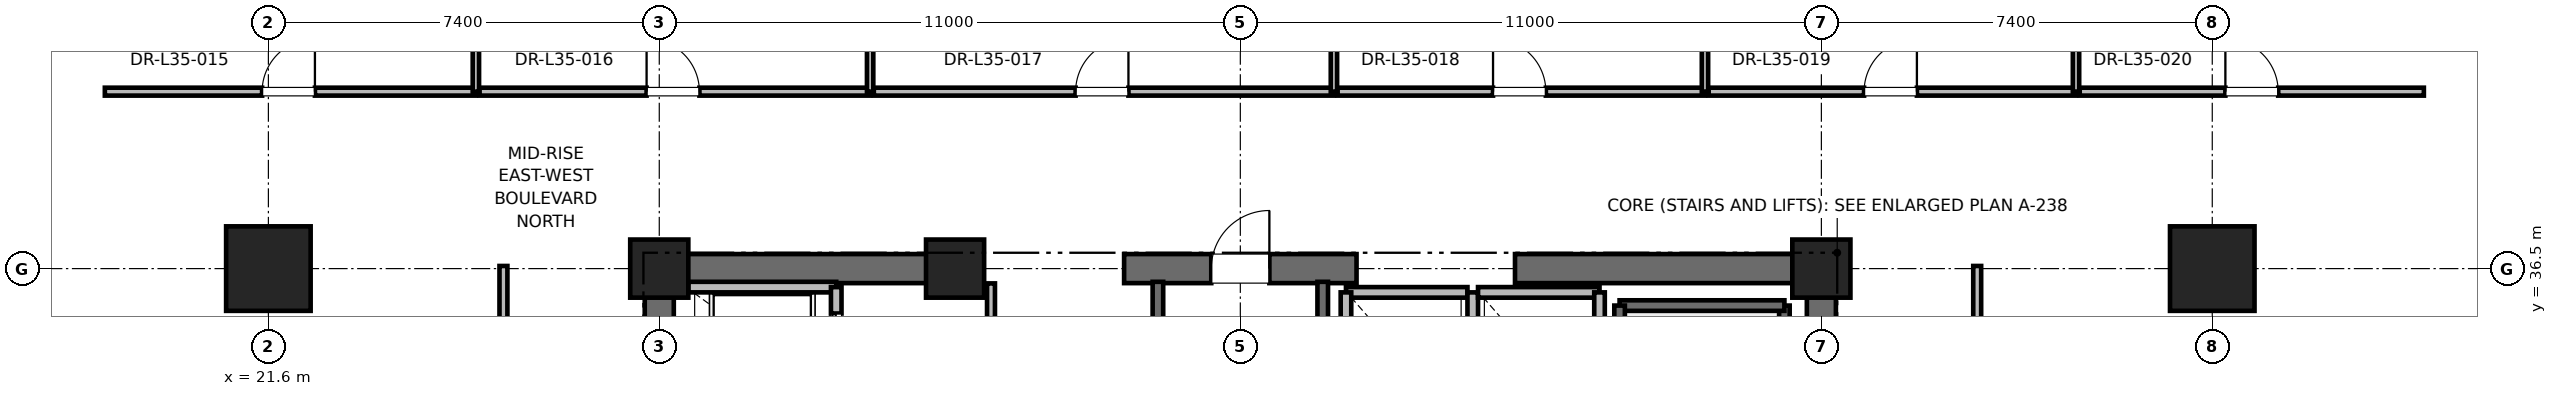
"""IFC4 building model, lengths in metres.
Left out: names, types, materials, properties, quantities, classifications, styles, units other than length and angle.
Written with IfcOpenShell. Run it as: python <this file> out.ifc"""

import sys

from ifc_helpers import new_model, si_unit, direction, frame, frame_2d, origin, origin_2d, place, context, subcontext, project, spatial, rectangle, extrude, element, fill, save


model = new_model("IFC4")
c1 = context("Model", 3, precision=1e-05, world=origin(), true_north=direction((0.0, 1.0)))
c2 = subcontext(c1, "Body", "Model", "MODEL_VIEW")
j1 = project(units=[si_unit("LENGTHUNIT", "METRE"), si_unit("PLANEANGLEUNIT", "RADIAN")], contexts=[c1])
p1 = place(None, origin())
s1 = spatial("IfcSite", under=j1, at=p1, CompositionType="ELEMENT")
p2 = place(p1, origin())
s2 = spatial("IfcBuilding", under=s1, at=p2, CompositionType="ELEMENT")
p3 = place(p2, frame((0.0, 0.0, 152.4)))
s3 = spatial("IfcBuildingStorey", under=s2, at=p3, CompositionType="ELEMENT", Elevation=152.4)
for number, where, z_axis, x_axis in (
    (1, (21.6, 36.5, 0.0), (0.0, 0.0, 1.0), (1.0, 0.0, 0.0)),
    (2, (58.4, 36.5, 0.0), (0.0, 0.0, 1.0), (1.0, 0.0, 0.0)),
):
    element("IfcColumn", number, at=place(p3, frame(where, z_axis=z_axis, x_axis=x_axis)), inside=s3, PredefinedType="COLUMN", context=c2, shape_type="SweptSolid", body=[
        extrude(rectangle(XDim=1.6, YDim=1.6, at=origin_2d()), origin(), (0.0, 0.0, 1.0), 4.0),
    ])
for number, where, z_axis, x_axis in (
    (3, (29.0, 36.5, 0.0), (0.0, 0.0, 1.0), (1.0, 0.0, 0.0)),
    (4, (51.0, 36.5, 0.0), (0.0, 0.0, 1.0), (1.0, 0.0, 0.0)),
    (5, (34.6, 36.5, 0.0), (0.0, 0.0, 1.0), (1.0, 0.0, 0.0)),
):
    element("IfcColumn", number, at=place(p3, frame(where, z_axis=z_axis, x_axis=x_axis)), inside=s3, PredefinedType="PILASTER", context=c2, shape_type="SweptSolid", body=[
        extrude(rectangle(XDim=1.1, YDim=1.1, at=origin_2d()), origin(), (0.0, 0.0, 1.0), 4.0),
    ])
p4 = place(p3, frame((29.0, 36.5, 0.0), z_axis=(0.0, 0.0, 1.0), x_axis=(1.0, 0.0, 0.0)))
e6 = element("IfcWall", 6, at=p4, inside=s3, PredefinedType="SHEAR", context=c2, shape_type="SweptSolid", body=[
    extrude(rectangle(XDim=5.8, YDim=0.55, at=frame_2d((2.9, 0.0))), origin(), (0.0, 0.0, 1.0), 3.775),
])
p5 = place(p3, frame((37.8, 36.5, 0.0), z_axis=(0.0, 0.0, 1.0), x_axis=(1.0, 0.0, 0.0)))
e7 = element("IfcWall", 7, at=p5, inside=s3, PredefinedType="SHEAR", context=c2, shape_type="SweptSolid", body=[
    extrude(rectangle(XDim=4.4, YDim=0.55, at=frame_2d((2.2, 0.0))), origin(), (0.0, 0.0, 1.0), 3.775),
])
p6 = place(p5, frame((1.65, 0.0, 0.0)))
e8 = element("IfcOpeningElement", 8, at=p6, cuts=e7, PredefinedType="OPENING", context=c2, shape_type="SweptSolid", body=[
    extrude(rectangle(XDim=1.1, YDim=2.15, at=frame_2d((0.55, 1.075))), frame((0.0, 0.275, 0.0), z_axis=(0.0, -1.0, 0.0), x_axis=(1.0, 0.0, 0.0)), (0.0, 0.0, 1.0), 0.55),
])
for number, where, z_axis, x_axis in (
    (9, (45.2, 36.5, 0.0), (0.0, 0.0, 1.0), (1.0, 0.0, 0.0)),
    (10, (29.0, 30.7, 0.0), (0.0, 0.0, 1.0), (0.0, 1.0, 0.0)),
):
    element("IfcWall", number, at=place(p3, frame(where, z_axis=z_axis, x_axis=x_axis)), inside=s3, PredefinedType="SHEAR", context=c2, shape_type="SweptSolid", body=[
        extrude(rectangle(XDim=5.8, YDim=0.55, at=frame_2d((2.9, 0.0))), origin(), (0.0, 0.0, 1.0), 3.775),
    ])
p7 = place(p3, frame((51.0, 27.7, 0.0), z_axis=(0.0, 0.0, 1.0), x_axis=(0.0, 1.0, 0.0)))
e11 = element("IfcWall", 11, at=p7, inside=s3, PredefinedType="SHEAR", context=c2, shape_type="SweptSolid", body=[
    extrude(rectangle(XDim=8.8, YDim=0.55, at=frame_2d((4.4, 0.0))), origin(), (0.0, 0.0, 1.0), 3.775),
])
p8 = place(p3, frame((50.3, 27.65, 0.0), z_axis=(0.0, 0.0, 1.0), x_axis=(0.0, 1.0, 0.0)))
e12 = element("IfcWall", 12, at=p8, inside=s3, PredefinedType="SOLIDWALL", context=c2, shape_type="SweptSolid", body=[
    extrude(rectangle(XDim=8.15, YDim=0.2, at=frame_2d((4.075, 0.0))), origin(), (0.0, 0.0, 1.0), 3.775),
])
p9 = place(p3, frame((47.18, 35.8, 0.0), z_axis=(0.0, 0.0, 1.0), x_axis=(1.0, 0.0, 0.0)))
e13 = element("IfcWall", 13, at=p9, inside=s3, PredefinedType="SOLIDWALL", context=c2, shape_type="SweptSolid", body=[
    extrude(rectangle(XDim=3.12, YDim=0.2, at=frame_2d((1.56, 0.0))), origin(), (0.0, 0.0, 1.0), 3.775),
])
p10 = place(p3, frame((47.18, 27.62, 0.0), z_axis=(0.0, 0.0, 1.0), x_axis=(0.0, 1.0, 0.0)))
e14 = element("IfcWall", 14, at=p10, inside=s3, PredefinedType="SOLIDWALL", context=c2, shape_type="SweptSolid", body=[
    extrude(rectangle(XDim=8.18, YDim=0.2, at=frame_2d((4.09, 0.0))), origin(), (0.0, 0.0, 1.0), 3.775),
])
p11 = place(p3, frame((38.44, 27.38, 0.0), z_axis=(0.0, 0.0, 1.0), x_axis=(0.0, 1.0, 0.0)))
e15 = element("IfcWall", 15, at=p11, inside=s3, PredefinedType="SOLIDWALL", context=c2, shape_type="SweptSolid", body=[
    extrude(rectangle(XDim=8.87, YDim=0.2, at=frame_2d((4.435, 0.0))), origin(), (0.0, 0.0, 1.0), 3.775),
])
p12 = place(p3, frame((41.56, 27.68, 0.0), z_axis=(0.0, 0.0, 1.0), x_axis=(0.0, 1.0, 0.0)))
e16 = element("IfcWall", 16, at=p12, inside=s3, PredefinedType="SOLIDWALL", context=c2, shape_type="SweptSolid", body=[
    extrude(rectangle(XDim=8.57, YDim=0.2, at=frame_2d((4.285, 0.0))), origin(), (0.0, 0.0, 1.0), 3.775),
])
p13 = place(p3, frame((32.35, 36.15, 0.0), z_axis=(0.0, 0.0, 1.0), x_axis=(-1.0, 0.0, 0.0)))
e17 = element("IfcWall", 17, at=p13, inside=s3, PredefinedType="SOLIDWALL", context=c2, shape_type="SweptSolid", body=[
    extrude(rectangle(XDim=2.8, YDim=0.2, at=frame_2d((1.4, 0.0))), origin(), (0.0, 0.0, 1.0), 2.985),
])
p14 = place(p3, frame((32.35, 34.05, 0.0), z_axis=(0.0, 0.0, 1.0), x_axis=(0.0, 1.0, 0.0)))
e18 = element("IfcWall", 18, at=p14, inside=s3, PredefinedType="SOLIDWALL", context=c2, shape_type="SweptSolid", body=[
    extrude(rectangle(XDim=2.1, YDim=0.2, at=frame_2d((1.05, 0.0))), origin(), (0.0, 0.0, 1.0), 3.775),
])
p15 = place(p14, frame((0.5, 0.0, 0.0)))
e19 = element("IfcOpeningElement", 19, at=p15, cuts=e18, PredefinedType="OPENING", context=c2, shape_type="SweptSolid", body=[
    extrude(rectangle(XDim=1.1, YDim=2.2, at=frame_2d((0.55, 1.1))), frame((0.0, 0.1, 0.0), z_axis=(0.0, -1.0, 0.0), x_axis=(1.0, 0.0, 0.0)), (0.0, 0.0, 1.0), 0.2),
])
p16 = place(p3, frame((44.3, 36.05, 0.0), z_axis=(0.0, 0.0, 1.0), x_axis=(-1.0, 0.0, 0.0)))
e20 = element("IfcWall", 20, at=p16, inside=s3, PredefinedType="SOLIDWALL", context=c2, shape_type="SweptSolid", body=[
    extrude(rectangle(XDim=2.3, YDim=0.2, at=frame_2d((1.15, 0.0))), origin(), (0.0, 0.0, 1.0), 2.755),
])
for number, where, z_axis, x_axis in (
    (21, (42.0, 36.05, 0.0), (0.0, 0.0, 1.0), (0.0, -1.0, 0.0)),
    (22, (44.4, 33.45, 0.0), (0.0, 0.0, 1.0), (0.0, 1.0, 0.0)),
):
    element("IfcWall", number, at=place(p3, frame(where, z_axis=z_axis, x_axis=x_axis)), inside=s3, PredefinedType="SOLIDWALL", context=c2, shape_type="SweptSolid", body=[
        extrude(rectangle(XDim=2.6, YDim=0.2, at=frame_2d((1.3, 0.0))), origin(), (0.0, 0.0, 1.0), 2.755),
    ])
p17 = place(p3, frame((46.8, 36.05, 0.0), z_axis=(0.0, 0.0, 1.0), x_axis=(-1.0, 0.0, 0.0)))
e23 = element("IfcWall", 23, at=p17, inside=s3, PredefinedType="SOLIDWALL", context=c2, shape_type="SweptSolid", body=[
    extrude(rectangle(XDim=2.3, YDim=0.2, at=frame_2d((1.15, 0.0))), origin(), (0.0, 0.0, 1.0), 2.755),
])
p18 = place(p3, frame((46.8, 33.45, 0.0), z_axis=(0.0, 0.0, 1.0), x_axis=(0.0, 1.0, 0.0)))
e24 = element("IfcWall", 24, at=p18, inside=s3, PredefinedType="SOLIDWALL", context=c2, shape_type="SweptSolid", body=[
    extrude(rectangle(XDim=2.6, YDim=0.2, at=frame_2d((1.3, 0.0))), origin(), (0.0, 0.0, 1.0), 3.775),
])
p19 = place(p3, frame((35.28, 33.95, 0.0), z_axis=(0.0, 0.0, 1.0), x_axis=(0.0, 1.0, 0.0)))
e25 = element("IfcWall", 25, at=p19, inside=s3, PredefinedType="PARTITIONING", context=c2, shape_type="SweptSolid", body=[
    extrude(rectangle(XDim=2.27, YDim=0.15, at=frame_2d((1.135, 0.0))), origin(), (0.0, 0.0, 1.0), 2.755),
])
p20 = place(p19, frame((0.66, 0.0, 0.0)))
e26 = element("IfcOpeningElement", 26, at=p20, cuts=e25, PredefinedType="OPENING", context=c2, shape_type="SweptSolid", body=[
    extrude(rectangle(XDim=0.95, YDim=2.15, at=frame_2d((0.475, 1.075))), frame((0.0, 0.075, 0.0), z_axis=(0.0, -1.0, 0.0), x_axis=(1.0, 0.0, 0.0)), (0.0, 0.0, 1.0), 0.15),
])
p21 = place(p3, frame((18.504, 39.85, 0.0), z_axis=(0.0, 0.0, 1.0), x_axis=(1.0, 0.0, 0.0)))
e27 = element("IfcWall", 27, at=p21, inside=s3, PredefinedType="PARTITIONING", context=c2, shape_type="SweptSolid", body=[
    extrude(rectangle(XDim=7.024, YDim=0.15, at=frame_2d((3.512, 0.0))), origin(), (0.0, 0.0, 1.0), 2.85),
])
p22 = place(p21, frame((2.977, 0.0, 0.0)))
e28 = element("IfcOpeningElement", 28, at=p22, cuts=e27, PredefinedType="OPENING", context=c2, shape_type="SweptSolid", body=[
    extrude(rectangle(XDim=1.0, YDim=2.15, at=frame_2d((0.5, 1.075))), frame((0.0, 0.075, 0.0), z_axis=(0.0, -1.0, 0.0), x_axis=(1.0, 0.0, 0.0)), (0.0, 0.0, 1.0), 0.15),
])
p23 = place(p3, frame((25.528, 39.85, 0.0), z_axis=(0.0, 0.0, 1.0), x_axis=(0.0, 1.0, 0.0)))
e29 = element("IfcWall", 29, at=p23, inside=s3, PredefinedType="PARTITIONING", context=c2, shape_type="SweptSolid", body=[
    extrude(rectangle(XDim=9.777, YDim=0.12, at=frame_2d((4.889, 0.0))), origin(), (0.0, 0.0, 1.0), 2.85),
])
p24 = place(p3, frame((25.598, 39.85, 0.0), z_axis=(0.0, 0.0, 1.0), x_axis=(1.0, 0.0, 0.0)))
e30 = element("IfcWall", 30, at=p24, inside=s3, PredefinedType="PARTITIONING", context=c2, shape_type="SweptSolid", body=[
    extrude(rectangle(XDim=7.393, YDim=0.15, at=frame_2d((3.697, 0.0))), origin(), (0.0, 0.0, 1.0), 2.85),
])
p25 = place(p24, frame((3.162, 0.0, 0.0)))
e31 = element("IfcOpeningElement", 31, at=p25, cuts=e30, PredefinedType="OPENING", context=c2, shape_type="SweptSolid", body=[
    extrude(rectangle(XDim=1.0, YDim=2.15, at=frame_2d((0.5, 1.075))), frame((0.0, 0.075, 0.0), z_axis=(0.0, -1.0, 0.0), x_axis=(1.0, 0.0, 0.0)), (0.0, 0.0, 1.0), 0.15),
])
p26 = place(p3, frame((32.992, 39.85, 0.0), z_axis=(0.0, 0.0, 1.0), x_axis=(0.0, 1.0, 0.0)))
e32 = element("IfcWall", 32, at=p26, inside=s3, PredefinedType="PARTITIONING", context=c2, shape_type="SweptSolid", body=[
    extrude(rectangle(XDim=9.777, YDim=0.12, at=frame_2d((4.889, 0.0))), origin(), (0.0, 0.0, 1.0), 2.405),
])
p27 = place(p3, frame((33.062, 39.85, 0.0), z_axis=(0.0, 0.0, 1.0), x_axis=(1.0, 0.0, 0.0)))
e33 = element("IfcWall", 33, at=p27, inside=s3, PredefinedType="PARTITIONING", context=c2, shape_type="SweptSolid", body=[
    extrude(rectangle(XDim=8.71, YDim=0.15, at=frame_2d((4.355, 0.0))), origin(), (0.0, 0.0, 1.0), 2.85),
])
p28 = place(p27, frame((3.82, 0.0, 0.0)))
e34 = element("IfcOpeningElement", 34, at=p28, cuts=e33, PredefinedType="OPENING", context=c2, shape_type="SweptSolid", body=[
    extrude(rectangle(XDim=1.0, YDim=2.15, at=frame_2d((0.5, 1.075))), frame((0.0, 0.075, 0.0), z_axis=(0.0, -1.0, 0.0), x_axis=(1.0, 0.0, 0.0)), (0.0, 0.0, 1.0), 0.15),
])
p29 = place(p3, frame((41.772, 39.85, 0.0), z_axis=(0.0, 0.0, 1.0), x_axis=(0.0, 1.0, 0.0)))
e35 = element("IfcWall", 35, at=p29, inside=s3, PredefinedType="PARTITIONING", context=c2, shape_type="SweptSolid", body=[
    extrude(rectangle(XDim=9.777, YDim=0.12, at=frame_2d((4.889, 0.0))), origin(), (0.0, 0.0, 1.0), 2.405),
])
p30 = place(p3, frame((41.842, 39.85, 0.0), z_axis=(0.0, 0.0, 1.0), x_axis=(1.0, 0.0, 0.0)))
e36 = element("IfcWall", 36, at=p30, inside=s3, PredefinedType="PARTITIONING", context=c2, shape_type="SweptSolid", body=[
    extrude(rectangle(XDim=6.954, YDim=0.15, at=frame_2d((3.477, 0.0))), origin(), (0.0, 0.0, 1.0), 2.85),
])
p31 = place(p30, frame((2.942, 0.0, 0.0)))
e37 = element("IfcOpeningElement", 37, at=p31, cuts=e36, PredefinedType="OPENING", context=c2, shape_type="SweptSolid", body=[
    extrude(rectangle(XDim=1.0, YDim=2.15, at=frame_2d((0.5, 1.075))), frame((0.0, 0.075, 0.0), z_axis=(0.0, -1.0, 0.0), x_axis=(1.0, 0.0, 0.0)), (0.0, 0.0, 1.0), 0.15),
])
p32 = place(p3, frame((48.796, 39.85, 0.0), z_axis=(0.0, 0.0, 1.0), x_axis=(0.0, 1.0, 0.0)))
e38 = element("IfcWall", 38, at=p32, inside=s3, PredefinedType="PARTITIONING", context=c2, shape_type="SweptSolid", body=[
    extrude(rectangle(XDim=9.777, YDim=0.12, at=frame_2d((4.889, 0.0))), origin(), (0.0, 0.0, 1.0), 2.405),
])
p33 = place(p3, frame((48.866, 39.85, 0.0), z_axis=(0.0, 0.0, 1.0), x_axis=(1.0, 0.0, 0.0)))
e39 = element("IfcWall", 39, at=p33, inside=s3, PredefinedType="PARTITIONING", context=c2, shape_type="SweptSolid", body=[
    extrude(rectangle(XDim=6.954, YDim=0.15, at=frame_2d((3.477, 0.0))), origin(), (0.0, 0.0, 1.0), 2.85),
])
p34 = place(p33, frame((2.942, 0.0, 0.0)))
e40 = element("IfcOpeningElement", 40, at=p34, cuts=e39, PredefinedType="OPENING", context=c2, shape_type="SweptSolid", body=[
    extrude(rectangle(XDim=1.0, YDim=2.15, at=frame_2d((0.5, 1.075))), frame((0.0, 0.075, 0.0), z_axis=(0.0, -1.0, 0.0), x_axis=(1.0, 0.0, 0.0)), (0.0, 0.0, 1.0), 0.15),
])
p35 = place(p3, frame((55.821, 39.85, 0.0), z_axis=(0.0, 0.0, 1.0), x_axis=(0.0, 1.0, 0.0)))
e41 = element("IfcWall", 41, at=p35, inside=s3, PredefinedType="PARTITIONING", context=c2, shape_type="SweptSolid", body=[
    extrude(rectangle(XDim=9.777, YDim=0.12, at=frame_2d((4.889, 0.0))), origin(), (0.0, 0.0, 1.0), 2.85),
])
p36 = place(p3, frame((55.891, 39.85, 0.0), z_axis=(0.0, 0.0, 1.0), x_axis=(1.0, 0.0, 0.0)))
e42 = element("IfcWall", 42, at=p36, inside=s3, PredefinedType="PARTITIONING", context=c2, shape_type="SweptSolid", body=[
    extrude(rectangle(XDim=6.515, YDim=0.15, at=frame_2d((3.258, 0.0))), origin(), (0.0, 0.0, 1.0), 2.85),
])
p37 = place(p36, frame((2.758, 0.0, 0.0)))
e43 = element("IfcOpeningElement", 43, at=p37, cuts=e42, PredefinedType="OPENING", context=c2, shape_type="SweptSolid", body=[
    extrude(rectangle(XDim=1.0, YDim=2.15, at=frame_2d((0.5, 1.075))), frame((0.0, 0.075, 0.0), z_axis=(0.0, -1.0, 0.0), x_axis=(1.0, 0.0, 0.0)), (0.0, 0.0, 1.0), 0.15),
])
p38 = place(p3, frame((26.05, 18.45, 0.0), z_axis=(0.0, 0.0, 1.0), x_axis=(0.0, 1.0, 0.0)))
e44 = element("IfcWall", 44, at=p38, inside=s3, PredefinedType="PARTITIONING", context=c2, shape_type="SweptSolid", body=[
    extrude(rectangle(XDim=18.1, YDim=0.15, at=frame_2d((9.05, 0.0))), origin(), (0.0, 0.0, 1.0), 2.85),
])
p39 = place(p38, frame((8.55, 0.0, 0.0)))
e45 = element("IfcOpeningElement", 45, at=p39, cuts=e44, PredefinedType="OPENING", context=c2, shape_type="SweptSolid", body=[
    extrude(rectangle(XDim=1.0, YDim=2.15, at=frame_2d((0.5, 1.075))), frame((0.0, 0.075, 0.0), z_axis=(0.0, -1.0, 0.0), x_axis=(1.0, 0.0, 0.0)), (0.0, 0.0, 1.0), 0.15),
])
p40 = place(p3, frame((53.95, 18.45, 0.0), z_axis=(0.0, 0.0, 1.0), x_axis=(0.0, 1.0, 0.0)))
e46 = element("IfcWall", 46, at=p40, inside=s3, PredefinedType="PARTITIONING", context=c2, shape_type="SweptSolid", body=[
    extrude(rectangle(XDim=18.1, YDim=0.15, at=frame_2d((9.05, 0.0))), origin(), (0.0, 0.0, 1.0), 2.85),
])
p41 = place(p40, frame((8.55, 0.0, 0.0)))
e47 = element("IfcOpeningElement", 47, at=p41, cuts=e46, PredefinedType="OPENING", context=c2, shape_type="SweptSolid", body=[
    extrude(rectangle(XDim=1.0, YDim=2.15, at=frame_2d((0.5, 1.075))), frame((0.0, 0.075, 0.0), z_axis=(0.0, -1.0, 0.0), x_axis=(1.0, 0.0, 0.0)), (0.0, 0.0, 1.0), 0.15),
])
p42 = place(p6, origin())
e48 = element("IfcDoor", 48, at=p42, inside=s3, OperationType="SINGLE_SWING_RIGHT", PredefinedType="DOOR", context=c2, shape_type="SweptSolid", body=[
    extrude(rectangle(XDim=1.1, YDim=2.15, at=frame_2d((0.55, 1.075))), frame((0.0, 0.025, 0.0), z_axis=(0.0, -1.0, 0.0), x_axis=(1.0, 0.0, 0.0)), (0.0, 0.0, 1.0), 0.05),
])
fill(e8, e48)
p43 = place(p15, origin())
e49 = element("IfcDoor", 49, at=p43, inside=s3, OperationType="SLIDING_TO_RIGHT", PredefinedType="DOOR", context=c2, shape_type="SweptSolid", body=[
    extrude(rectangle(XDim=1.1, YDim=2.2, at=frame_2d((0.55, 1.1))), frame((0.0, 0.025, 0.0), z_axis=(0.0, -1.0, 0.0), x_axis=(1.0, 0.0, 0.0)), (0.0, 0.0, 1.0), 0.05),
])
fill(e19, e49)
p44 = place(p22, origin())
e50 = element("IfcDoor", 50, at=p44, inside=s3, OperationType="SINGLE_SWING_RIGHT", PredefinedType="DOOR", context=c2, shape_type="SweptSolid", body=[
    extrude(rectangle(XDim=1.0, YDim=2.15, at=frame_2d((0.5, 1.075))), frame((0.0, 0.025, 0.0), z_axis=(0.0, -1.0, 0.0), x_axis=(1.0, 0.0, 0.0)), (0.0, 0.0, 1.0), 0.05),
])
fill(e28, e50)
p45 = place(p25, origin())
e51 = element("IfcDoor", 51, at=p45, inside=s3, OperationType="SINGLE_SWING_LEFT", PredefinedType="DOOR", context=c2, shape_type="SweptSolid", body=[
    extrude(rectangle(XDim=1.0, YDim=2.15, at=frame_2d((0.5, 1.075))), frame((0.0, 0.025, 0.0), z_axis=(0.0, -1.0, 0.0), x_axis=(1.0, 0.0, 0.0)), (0.0, 0.0, 1.0), 0.05),
])
fill(e31, e51)
p46 = place(p28, origin())
e52 = element("IfcDoor", 52, at=p46, inside=s3, OperationType="SINGLE_SWING_RIGHT", PredefinedType="DOOR", context=c2, shape_type="SweptSolid", body=[
    extrude(rectangle(XDim=1.0, YDim=2.15, at=frame_2d((0.5, 1.075))), frame((0.0, 0.025, 0.0), z_axis=(0.0, -1.0, 0.0), x_axis=(1.0, 0.0, 0.0)), (0.0, 0.0, 1.0), 0.05),
])
fill(e34, e52)
p47 = place(p31, origin())
e53 = element("IfcDoor", 53, at=p47, inside=s3, OperationType="SINGLE_SWING_LEFT", PredefinedType="DOOR", context=c2, shape_type="SweptSolid", body=[
    extrude(rectangle(XDim=1.0, YDim=2.15, at=frame_2d((0.5, 1.075))), frame((0.0, 0.025, 0.0), z_axis=(0.0, -1.0, 0.0), x_axis=(1.0, 0.0, 0.0)), (0.0, 0.0, 1.0), 0.05),
])
fill(e37, e53)
p48 = place(p34, origin())
e54 = element("IfcDoor", 54, at=p48, inside=s3, OperationType="SINGLE_SWING_RIGHT", PredefinedType="DOOR", context=c2, shape_type="SweptSolid", body=[
    extrude(rectangle(XDim=1.0, YDim=2.15, at=frame_2d((0.5, 1.075))), frame((0.0, 0.025, 0.0), z_axis=(0.0, -1.0, 0.0), x_axis=(1.0, 0.0, 0.0)), (0.0, 0.0, 1.0), 0.05),
])
fill(e40, e54)
p49 = place(p37, origin())
e55 = element("IfcDoor", 55, at=p49, inside=s3, OperationType="SINGLE_SWING_LEFT", PredefinedType="DOOR", context=c2, shape_type="SweptSolid", body=[
    extrude(rectangle(XDim=1.0, YDim=2.15, at=frame_2d((0.5, 1.075))), frame((0.0, 0.025, 0.0), z_axis=(0.0, -1.0, 0.0), x_axis=(1.0, 0.0, 0.0)), (0.0, 0.0, 1.0), 0.05),
])
fill(e43, e55)
save(model, sys.argv[1])
